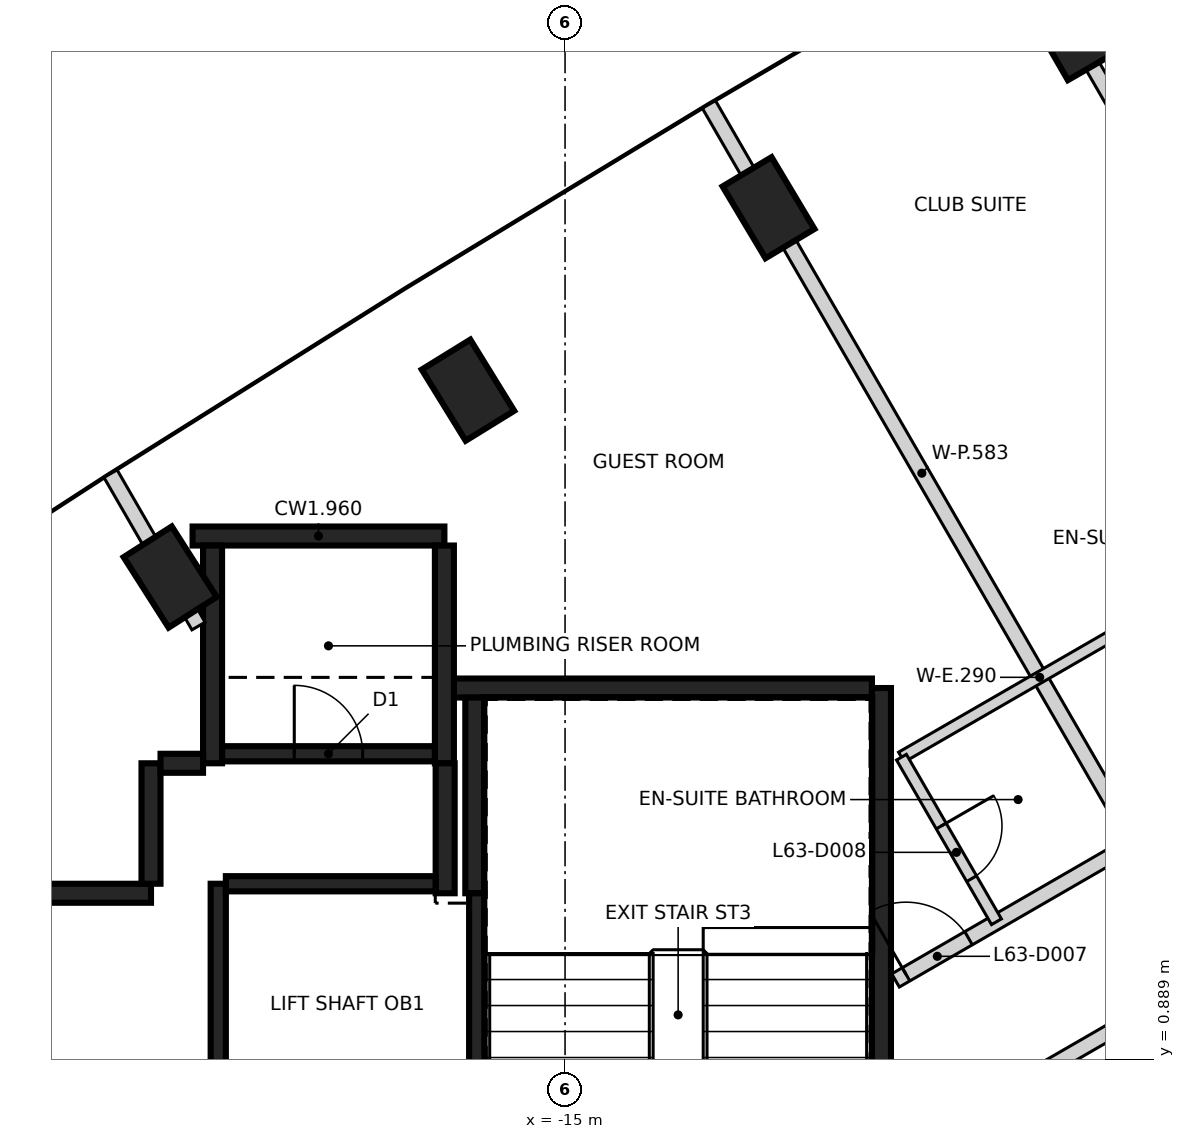
"""IFC4 building model, lengths in metres.
Left out: names, types, materials, properties, quantities, classifications, styles, units other than length and angle.
Written with IfcOpenShell. Run it as: python <this file> out.ifc"""

import sys

from ifc_helpers import new_model, si_unit, direction, frame, frame_2d, origin, origin_2d, place, context, subcontext, project, spatial, rectangle, extrude, element, fill, save


model = new_model("IFC4")
c1 = context("Model", 3, precision=1e-05, world=origin(), true_north=direction((0.0, 1.0)))
c2 = subcontext(c1, "Body", "Model", "MODEL_VIEW")
j1 = project(units=[si_unit("LENGTHUNIT", "METRE"), si_unit("PLANEANGLEUNIT", "RADIAN")], contexts=[c1])
p1 = place(None, origin())
s1 = spatial("IfcSite", under=j1, at=p1, CompositionType="ELEMENT")
p2 = place(p1, origin())
s2 = spatial("IfcBuilding", under=s1, at=p2, CompositionType="ELEMENT")
p3 = place(p2, frame((0.0, 0.0, 250.2)))
s3 = spatial("IfcBuildingStorey", under=s2, at=p3, CompositionType="ELEMENT", Elevation=250.2)
for number, where, z_axis, x_axis in (
    (1, (-8.335, 14.436, -0.35), (0.0, 0.0, 1.0), (-0.5, 0.866, 0.0)),
    (2, (-12.323, 12.094, -0.35), (0.0, 0.0, 1.0), (-0.513, 0.858, 0.0)),
    (3, (-16.277, 9.693, -0.35), (0.0, 0.0, 1.0), (-0.525, 0.851, 0.0)),
    (4, (-20.195, 7.235, -0.35), (0.0, 0.0, 1.0), (-0.538, 0.843, 0.0)),
):
    element("IfcColumn", number, at=place(p3, frame(where, z_axis=z_axis, x_axis=x_axis)), inside=s3, PredefinedType="COLUMN", context=c2, shape_type="SweptSolid", body=[
        extrude(rectangle(XDim=1.1, YDim=0.75, at=origin_2d()), origin(), (0.0, 0.0, 1.0), 3.6),
    ])
p4 = place(p3, frame((-10.837, 5.775, 0.0), z_axis=(0.0, 0.0, 1.0), x_axis=(0.0, -1.0, 0.0)))
e5 = element("IfcWall", 5, at=p4, inside=s3, PredefinedType="SHEAR", context=c2, shape_type="SweptSolid", body=[
    extrude(rectangle(XDim=11.55, YDim=0.25, at=frame_2d((5.775, 0.0))), origin(), (0.0, 0.0, 1.0), 3.25),
])
p5 = place(p4, frame((10.025, 0.0, 0.0)))
e6 = element("IfcOpeningElement", 6, at=p5, cuts=e5, PredefinedType="OPENING", context=c2, shape_type="SweptSolid", body=[
    extrude(rectangle(XDim=1.2, YDim=2.1, at=frame_2d((0.6, 1.05))), frame((0.0, 0.135, 0.0), z_axis=(0.0, -1.0, 0.0), x_axis=(1.0, 0.0, 0.0)), (0.0, 0.0, 1.0), 0.27),
])
p6 = place(p4, frame((8.725, 0.0, 0.0)))
e7 = element("IfcOpeningElement", 7, at=p6, cuts=e5, PredefinedType="OPENING", context=c2, shape_type="SweptSolid", body=[
    extrude(rectangle(XDim=1.2, YDim=2.1, at=frame_2d((0.6, 1.05))), frame((0.0, 0.135, 0.0), z_axis=(0.0, -1.0, 0.0), x_axis=(1.0, 0.0, 0.0)), (0.0, 0.0, 1.0), 0.27),
])
p7 = place(p3, frame((-16.472, 5.775, 0.0), z_axis=(0.0, 0.0, 1.0), x_axis=(1.0, 0.0, 0.0)))
e8 = element("IfcWall", 8, at=p7, inside=s3, PredefinedType="SHEAR", context=c2, shape_type="SweptSolid", body=[
    extrude(rectangle(XDim=5.51, YDim=0.25, at=frame_2d((2.755, 0.0))), origin(), (0.0, 0.0, 1.0), 3.25),
])
p8 = place(p3, frame((-19.9, 7.775, 0.0), z_axis=(0.0, 0.0, 1.0), x_axis=(1.0, 0.0, 0.0)))
e9 = element("IfcWall", 9, at=p8, inside=s3, PredefinedType="SHEAR", context=c2, shape_type="SweptSolid", body=[
    extrude(rectangle(XDim=3.313, YDim=0.25, at=frame_2d((1.656, 0.0))), origin(), (0.0, 0.0, 1.0), 3.25),
])
for number, where, z_axis, x_axis in (
    (10, (-16.587, 7.65, 0.0), (0.0, 0.0, 1.0), (0.0, -1.0, 0.0)),
    (11, (-19.637, 4.785, 0.0), (0.0, 0.0, 1.0), (0.0, 1.0, 0.0)),
):
    element("IfcWall", number, at=place(p3, frame(where, z_axis=z_axis, x_axis=x_axis)), inside=s3, PredefinedType="SHEAR", context=c2, shape_type="SweptSolid", body=[
        extrude(rectangle(XDim=2.865, YDim=0.25, at=frame_2d((1.432, 0.0))), origin(), (0.0, 0.0, 1.0), 3.25),
    ])
p9 = place(p3, frame((-16.187, 3.075, 0.0), z_axis=(0.0, 0.0, 1.0), x_axis=(0.0, 1.0, 0.0)))
e12 = element("IfcWall", 12, at=p9, inside=s3, PredefinedType="SHEAR", context=c2, shape_type="SweptSolid", body=[
    extrude(rectangle(XDim=2.575, YDim=0.25, at=frame_2d((1.287, 0.0))), origin(), (0.0, 0.0, 1.0), 3.25),
])
p10 = place(p3, frame((-22.312, 3.075, 0.0), z_axis=(0.0, 0.0, 1.0), x_axis=(1.0, 0.0, 0.0)))
e13 = element("IfcWall", 13, at=p10, inside=s3, PredefinedType="SHEAR", context=c2, shape_type="SweptSolid", body=[
    extrude(rectangle(XDim=1.865, YDim=0.25, at=frame_2d((0.932, 0.0))), origin(), (0.0, 0.0, 1.0), 3.25),
])
p11 = place(p3, frame((-16.577, 4.785, 0.0), z_axis=(0.0, 0.0, 1.0), x_axis=(0.0, -1.0, 0.0)))
e14 = element("IfcWall", 14, at=p11, inside=s3, PredefinedType="SHEAR", context=c2, shape_type="SweptSolid", body=[
    extrude(rectangle(XDim=1.71, YDim=0.25, at=frame_2d((0.855, 0.0))), origin(), (0.0, 0.0, 1.0), 3.25),
])
p12 = place(p3, frame((-20.447, 3.2, 0.0), z_axis=(0.0, 0.0, 1.0), x_axis=(0.0, 1.0, 0.0)))
e15 = element("IfcWall", 15, at=p12, inside=s3, PredefinedType="SHEAR", context=c2, shape_type="SweptSolid", body=[
    extrude(rectangle(XDim=1.584, YDim=0.25, at=frame_2d((0.792, 0.0))), origin(), (0.0, 0.0, 1.0), 3.25),
])
p13 = place(p3, frame((-20.322, 4.785, 0.0), z_axis=(0.0, 0.0, 1.0), x_axis=(1.0, 0.0, 0.0)))
e16 = element("IfcWall", 16, at=p13, inside=s3, PredefinedType="SHEAR", context=c2, shape_type="SweptSolid", body=[
    extrude(rectangle(XDim=0.559, YDim=0.25, at=frame_2d((0.28, 0.0))), origin(), (0.0, 0.0, 1.0), 3.25),
])
p14 = place(p3, frame((-16.162, 3.074, 0.0), z_axis=(0.0, 0.0, 1.0), x_axis=(0.0, -1.0, 0.0)))
e17 = element("IfcWall", 17, at=p14, inside=s3, PredefinedType="SHEAR", context=c2, shape_type="SweptSolid", body=[
    extrude(rectangle(XDim=5.974, YDim=0.2, at=frame_2d((2.987, 0.0))), origin(), (0.0, 0.0, 1.0), 3.25),
])
p15 = place(p3, frame((-19.562, -2.9, 0.0), z_axis=(0.0, 0.0, 1.0), x_axis=(0.0, 1.0, 0.0)))
e18 = element("IfcWall", 18, at=p15, inside=s3, PredefinedType="SHEAR", context=c2, shape_type="SweptSolid", body=[
    extrude(rectangle(XDim=6.1, YDim=0.2, at=frame_2d((3.05, 0.0))), origin(), (0.0, 0.0, 1.0), 3.25),
])
p16 = place(p3, frame((-19.511, 4.91, 0.0), z_axis=(0.0, 0.0, 1.0), x_axis=(1.0, 0.0, 0.0)))
e19 = element("IfcWall", 19, at=p16, inside=s3, PredefinedType="SHEAR", context=c2, shape_type="SweptSolid", body=[
    extrude(rectangle(XDim=2.798, YDim=0.2, at=frame_2d((1.399, 0.0))), origin(), (0.0, 0.0, 1.0), 3.25),
])
p17 = place(p16, frame((0.949, 0.0, 0.0)))
e20 = element("IfcOpeningElement", 20, at=p17, cuts=e19, PredefinedType="OPENING", context=c2, shape_type="SweptSolid", body=[
    extrude(rectangle(XDim=0.9, YDim=2.1, at=frame_2d((0.45, 1.05))), frame((0.0, 0.11, 0.0), z_axis=(0.0, -1.0, 0.0), x_axis=(1.0, 0.0, 0.0)), (0.0, 0.0, 1.0), 0.22),
])
p18 = place(p3, frame((-19.462, 3.2, 0.0), z_axis=(0.0, 0.0, 1.0), x_axis=(1.0, 0.0, 0.0)))
e21 = element("IfcWall", 21, at=p18, inside=s3, PredefinedType="SHEAR", context=c2, shape_type="SweptSolid", body=[
    extrude(rectangle(XDim=2.759, YDim=0.2, at=frame_2d((1.379, 0.0))), origin(), (0.0, 0.0, 1.0), 3.25),
])
p19 = place(p3, frame((-10.652, 1.928, 0.0), z_axis=(0.0, 0.0, 1.0), x_axis=(0.865793573301, 0.500401327367, 0.0)))
e22 = element("IfcWall", 22, at=p19, inside=s3, PredefinedType="PARTITIONING", context=c2, shape_type="SweptSolid", body=[
    extrude(rectangle(XDim=12.886, YDim=0.2, at=frame_2d((6.443, 0.0))), origin(), (0.0, 0.0, 1.0), 3.25),
])
p20 = place(p19, frame((7.123, 0.0, 0.0)))
e23 = element("IfcOpeningElement", 23, at=p20, cuts=e22, PredefinedType="OPENING", context=c2, shape_type="SweptSolid", body=[
    extrude(rectangle(XDim=0.95, YDim=2.1, at=frame_2d((0.475, 1.05))), frame((0.0, 0.11, 0.0), z_axis=(0.0, -1.0, 0.0), x_axis=(1.0, 0.0, 0.0)), (0.0, 0.0, 1.0), 0.22),
])
p21 = place(p19, frame((0.16, 0.0, 0.0)))
e24 = element("IfcOpeningElement", 24, at=p21, cuts=e22, PredefinedType="OPENING", context=c2, shape_type="SweptSolid", body=[
    extrude(rectangle(XDim=0.95, YDim=2.1, at=frame_2d((0.475, 1.05))), frame((0.0, 0.11, 0.0), z_axis=(0.0, -1.0, 0.0), x_axis=(1.0, 0.0, 0.0)), (0.0, 0.0, 1.0), 0.22),
])
p22 = place(p3, frame((-8.612, 0.801, 0.0), z_axis=(0.0, 0.0, 1.0), x_axis=(0.866005560651, 0.500034367741, 0.0)))
e25 = element("IfcWall", 25, at=p22, inside=s3, PredefinedType="PARTITIONING", context=c2, shape_type="SweptSolid", body=[
    extrude(rectangle(XDim=14.115, YDim=0.2, at=frame_2d((7.058, 0.0))), origin(), (0.0, 0.0, 1.0), 3.25),
])
p23 = place(p22, frame((10.131, 0.0, 0.0)))
e26 = element("IfcOpeningElement", 26, at=p23, cuts=e25, PredefinedType="OPENING", context=c2, shape_type="SweptSolid", body=[
    extrude(rectangle(XDim=0.9, YDim=2.1, at=frame_2d((0.45, 1.05))), frame((0.0, 0.11, 0.0), z_axis=(0.0, -1.0, 0.0), x_axis=(1.0, 0.0, 0.0)), (0.0, 0.0, 1.0), 0.22),
])
p24 = place(p22, frame((3.085, 0.0, 0.0)))
e27 = element("IfcOpeningElement", 27, at=p24, cuts=e25, PredefinedType="OPENING", context=c2, shape_type="SweptSolid", body=[
    extrude(rectangle(XDim=0.9, YDim=2.1, at=frame_2d((0.45, 1.05))), frame((0.0, 0.11, 0.0), z_axis=(0.0, -1.0, 0.0), x_axis=(1.0, 0.0, 0.0)), (0.0, 0.0, 1.0), 0.22),
])
p25 = place(p3, frame((-20.979, 8.595, 0.0), z_axis=(0.0, 0.0, 1.0), x_axis=(0.499950711303, -0.866053858757, 0.0)))
e28 = element("IfcWall", 28, at=p25, inside=s3, PredefinedType="PARTITIONING", context=c2, shape_type="SweptSolid", body=[
    extrude(rectangle(XDim=2.315, YDim=0.2, at=frame_2d((1.157, 0.0))), origin(), (0.0, 0.0, 1.0), 3.25),
])
p26 = place(p3, frame((-13.107, 13.453, 0.0), z_axis=(0.0, 0.0, 1.0), x_axis=(0.50003870279, -0.866003057565, 0.0)))
e29 = element("IfcWall", 29, at=p26, inside=s3, PredefinedType="PARTITIONING", context=c2, shape_type="SweptSolid", body=[
    extrude(rectangle(XDim=11.204, YDim=0.2, at=frame_2d((5.602, 0.0))), origin(), (0.0, 0.0, 1.0), 3.25),
])
p27 = place(p3, frame((-9.119, 15.795, 0.0), z_axis=(0.0, 0.0, 1.0), x_axis=(0.500015176972, -0.866016641178, 0.0)))
e30 = element("IfcWall", 30, at=p27, inside=s3, PredefinedType="PARTITIONING", context=c2, shape_type="SweptSolid", body=[
    extrude(rectangle(XDim=11.239, YDim=0.2, at=frame_2d((5.619, 0.0))), origin(), (0.0, 0.0, 1.0), 3.25),
])
p28 = place(p3, frame((-10.574, 4.866, 0.0), z_axis=(0.0, 0.0, 1.0), x_axis=(0.866052994476, 0.499952208475, 0.0)))
e31 = element("IfcWall", 31, at=p28, inside=s3, PredefinedType="PARTITIONING", context=c2, shape_type="SweptSolid", body=[
    extrude(rectangle(XDim=4.201, YDim=0.15, at=frame_2d((2.1, 0.0))), origin(), (0.0, 0.0, 1.0), 3.25),
])
p29 = place(p3, frame((-10.574, 4.865, 0.0), z_axis=(0.0, 0.0, 1.0), x_axis=(0.500004234368, -0.866022959057, 0.0)))
e32 = element("IfcWall", 32, at=p29, inside=s3, PredefinedType="PARTITIONING", context=c2, shape_type="SweptSolid", body=[
    extrude(rectangle(XDim=2.5, YDim=0.15, at=frame_2d((1.25, 0.0))), origin(), (0.0, 0.0, 1.0), 3.25),
])
p30 = place(p29, frame((1.045, 0.0, 0.0)))
e33 = element("IfcOpeningElement", 33, at=p30, cuts=e32, PredefinedType="OPENING", context=c2, shape_type="SweptSolid", body=[
    extrude(rectangle(XDim=0.8, YDim=2.1, at=frame_2d((0.4, 1.05))), frame((0.0, 0.085, 0.0), z_axis=(0.0, -1.0, 0.0), x_axis=(1.0, 0.0, 0.0)), (0.0, 0.0, 1.0), 0.17),
])
p31 = place(p17, origin())
e34 = element("IfcDoor", 34, at=p31, inside=s3, OperationType="SINGLE_SWING_LEFT", PredefinedType="DOOR", context=c2, shape_type="SweptSolid", body=[
    extrude(rectangle(XDim=0.9, YDim=2.1, at=frame_2d((0.45, 1.05))), frame((0.0, 0.025, 0.0), z_axis=(0.0, -1.0, 0.0), x_axis=(1.0, 0.0, 0.0)), (0.0, 0.0, 1.0), 0.05),
])
fill(e20, e34)
p32 = place(p21, origin())
e35 = element("IfcDoor", 35, at=p32, inside=s3, OperationType="SINGLE_SWING_LEFT", PredefinedType="DOOR", context=c2, shape_type="SweptSolid", body=[
    extrude(rectangle(XDim=0.95, YDim=2.1, at=frame_2d((0.475, 1.05))), frame((0.0, 0.025, 0.0), z_axis=(0.0, -1.0, 0.0), x_axis=(1.0, 0.0, 0.0)), (0.0, 0.0, 1.0), 0.05),
])
fill(e24, e35)
p33 = place(p30, frame((0.8, 0.0, 0.0), z_axis=(0.0, 0.0, 1.0), x_axis=(-1.0, 0.0, 0.0)))
e36 = element("IfcDoor", 36, at=p33, inside=s3, OperationType="SINGLE_SWING_LEFT", PredefinedType="DOOR", context=c2, shape_type="SweptSolid", body=[
    extrude(rectangle(XDim=0.8, YDim=2.1, at=frame_2d((0.4, 1.05))), frame((0.0, 0.025, 0.0), z_axis=(0.0, -1.0, 0.0), x_axis=(1.0, 0.0, 0.0)), (0.0, 0.0, 1.0), 0.05),
])
fill(e33, e36)
save(model, sys.argv[1])
